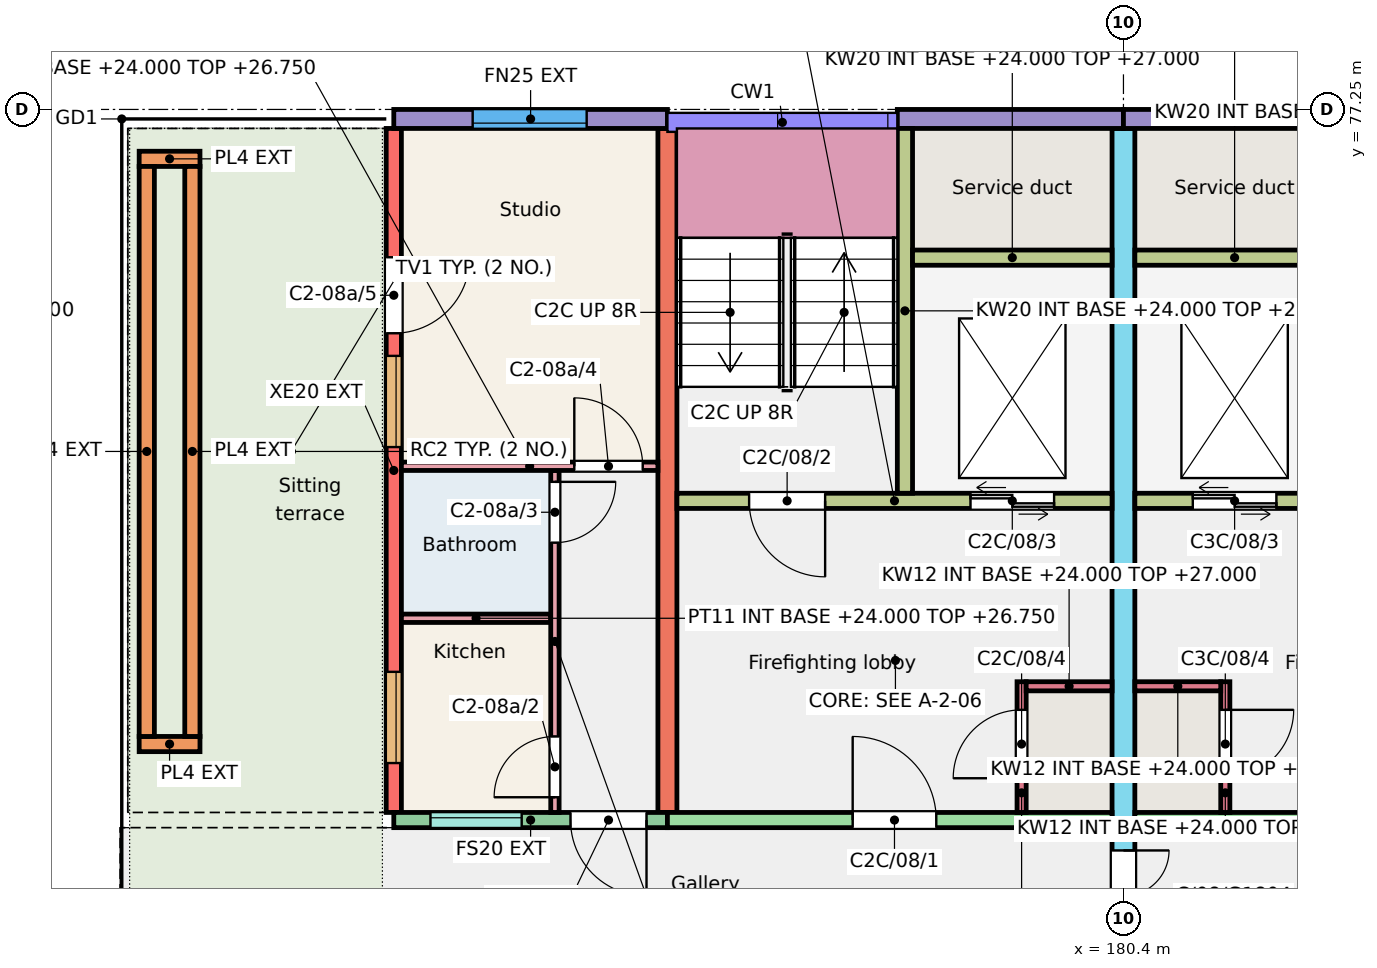
"""IFC4 building model, lengths in metres.
Left out: names, types, materials, properties, quantities, classifications, styles, units other than length and angle.
Written with IfcOpenShell. Run it as: python <this file> out.ifc"""

import sys

from ifc_helpers import new_model, si_unit, direction, frame, frame_2d, origin, place, context, subcontext, project, spatial, rectangle, extrude, element, fill, save


model = new_model("IFC4")
c1 = context("Model", 3, precision=1e-05, world=origin(), true_north=direction((0.0, 1.0)))
c2 = subcontext(c1, "Body", "Model", "MODEL_VIEW")
j1 = project(units=[si_unit("LENGTHUNIT", "METRE"), si_unit("PLANEANGLEUNIT", "RADIAN")], contexts=[c1])
p1 = place(None, origin())
s1 = spatial("IfcSite", under=j1, at=p1, CompositionType="ELEMENT")
p2 = place(p1, origin())
s2 = spatial("IfcBuilding", under=s1, at=p2, CompositionType="ELEMENT")
p3 = place(p2, frame((0.0, 0.0, 24.0)))
s3 = spatial("IfcBuildingStorey", under=s2, at=p3, CompositionType="ELEMENT", Elevation=24.0)
p4 = place(p3, frame((170.8, 68.0, 0.0), z_axis=(0.0, 0.0, 1.0), x_axis=(0.0, 1.0, 0.0)))
e1 = element("IfcWall", 1, at=p4, inside=s3, PredefinedType="SHEAR", context=c2, shape_type="SweptSolid", body=[
    extrude(rectangle(XDim=9.0, YDim=0.2, at=frame_2d((4.5, 0.0))), origin(), (0.0, 0.0, 1.0), 3.0),
])
p5 = place(p4, frame((0.65, 0.0, 0.9)))
e2 = element("IfcOpeningElement", 2, at=p5, cuts=e1, PredefinedType="OPENING", context=c2, shape_type="SweptSolid", body=[
    extrude(rectangle(XDim=1.2, YDim=1.5, at=frame_2d((0.6, 0.75))), frame((0.0, 0.11, 0.0), z_axis=(0.0, -1.0, 0.0), x_axis=(1.0, 0.0, 0.0)), (0.0, 0.0, 1.0), 0.22),
])
p6 = place(p4, frame((4.808, 0.0, 0.9)))
e3 = element("IfcOpeningElement", 3, at=p6, cuts=e1, PredefinedType="OPENING", context=c2, shape_type="SweptSolid", body=[
    extrude(rectangle(XDim=1.2, YDim=1.5, at=frame_2d((0.6, 0.75))), frame((0.0, 0.11, 0.0), z_axis=(0.0, -1.0, 0.0), x_axis=(1.0, 0.0, 0.0)), (0.0, 0.0, 1.0), 0.22),
])
p7 = place(p4, frame((6.305, 0.0, 0.0)))
e4 = element("IfcOpeningElement", 4, at=p7, cuts=e1, PredefinedType="OPENING", context=c2, shape_type="SweptSolid", body=[
    extrude(rectangle(XDim=1.0, YDim=2.1, at=frame_2d((0.5, 1.05))), frame((0.0, 0.11, 0.0), z_axis=(0.0, -1.0, 0.0), x_axis=(1.0, 0.0, 0.0)), (0.0, 0.0, 1.0), 0.22),
])
p8 = place(p3, frame((174.4, 68.0, 0.0), z_axis=(0.0, 0.0, 1.0), x_axis=(0.0, 1.0, 0.0)))
e5 = element("IfcWall", 5, at=p8, inside=s3, PredefinedType="SHEAR", context=c2, shape_type="SweptSolid", body=[
    extrude(rectangle(XDim=9.0, YDim=0.25, at=frame_2d((4.5, 0.0))), origin(), (0.0, 0.0, 1.0), 3.0),
])
p9 = place(p3, frame((180.4, 66.0, 0.0), z_axis=(0.0, 0.0, 1.0), x_axis=(0.0, 1.0, 0.0)))
e6 = element("IfcWall", 6, at=p9, inside=s3, PredefinedType="SHEAR", context=c2, shape_type="SweptSolid", body=[
    extrude(rectangle(XDim=11.0, YDim=0.3, at=frame_2d((5.5, 0.0))), origin(), (0.0, 0.0, 1.0), 3.0),
])
p10 = place(p9, frame((0.3, 0.0, 0.0)))
e7 = element("IfcOpeningElement", 7, at=p10, cuts=e6, PredefinedType="OPENING", context=c2, shape_type="SweptSolid", body=[
    extrude(rectangle(XDim=1.2, YDim=2.1, at=frame_2d((0.6, 1.05))), frame((0.0, 0.16, 0.0), z_axis=(0.0, -1.0, 0.0), x_axis=(1.0, 0.0, 0.0)), (0.0, 0.0, 1.0), 0.32),
])
p11 = place(p3, frame((170.8, 77.125, 0.0), z_axis=(0.0, 0.0, 1.0), x_axis=(1.0, 0.0, 0.0)))
e8 = element("IfcWall", 8, at=p11, inside=s3, PredefinedType="SOLIDWALL", context=c2, shape_type="SweptSolid", body=[
    extrude(rectangle(XDim=3.6, YDim=0.25, at=frame_2d((1.8, 0.0))), origin(), (0.0, 0.0, 1.0), 3.0),
])
p12 = place(p11, frame((1.038, 0.0, 0.9)))
e9 = element("IfcOpeningElement", 9, at=p12, cuts=e8, PredefinedType="OPENING", context=c2, shape_type="SweptSolid", body=[
    extrude(rectangle(XDim=1.5, YDim=1.5, at=frame_2d((0.75, 0.75))), frame((0.0, 0.135, 0.0), z_axis=(0.0, -1.0, 0.0), x_axis=(1.0, 0.0, 0.0)), (0.0, 0.0, 1.0), 0.27),
])
p13 = place(p3, frame((170.8, 67.9, 0.0), z_axis=(0.0, 0.0, 1.0), x_axis=(1.0, 0.0, 0.0)))
e10 = element("IfcWall", 10, at=p13, inside=s3, PredefinedType="SOLIDWALL", context=c2, shape_type="SweptSolid", body=[
    extrude(rectangle(XDim=3.6, YDim=0.2, at=frame_2d((1.8, 0.0))), origin(), (0.0, 0.0, 1.0), 3.0),
])
p14 = place(p13, frame((0.482, 0.0, 1.1)))
e11 = element("IfcOpeningElement", 11, at=p14, cuts=e10, PredefinedType="OPENING", context=c2, shape_type="SweptSolid", body=[
    extrude(rectangle(XDim=1.2, YDim=1.3, at=frame_2d((0.6, 0.65))), frame((0.0, 0.11, 0.0), z_axis=(0.0, -1.0, 0.0), x_axis=(1.0, 0.0, 0.0)), (0.0, 0.0, 1.0), 0.22),
])
p15 = place(p13, frame((2.325, 0.0, 0.0)))
e12 = element("IfcOpeningElement", 12, at=p15, cuts=e10, PredefinedType="OPENING", context=c2, shape_type="SweptSolid", body=[
    extrude(rectangle(XDim=1.0, YDim=2.1, at=frame_2d((0.5, 1.05))), frame((0.0, 0.11, 0.0), z_axis=(0.0, -1.0, 0.0), x_axis=(1.0, 0.0, 0.0)), (0.0, 0.0, 1.0), 0.22),
])
p16 = place(p3, frame((177.425, 77.125, 0.0), z_axis=(0.0, 0.0, 1.0), x_axis=(1.0, 0.0, 0.0)))
e13 = element("IfcWall", 13, at=p16, inside=s3, PredefinedType="SOLIDWALL", context=c2, shape_type="SweptSolid", body=[
    extrude(rectangle(XDim=2.975, YDim=0.25, at=frame_2d((1.487, 0.0))), origin(), (0.0, 0.0, 1.0), 3.0),
])
p17 = place(p3, frame((174.4, 67.9, 0.0), z_axis=(0.0, 0.0, 1.0), x_axis=(1.0, 0.0, 0.0)))
e14 = element("IfcWall", 14, at=p17, inside=s3, PredefinedType="SHEAR", context=c2, shape_type="SweptSolid", body=[
    extrude(rectangle(XDim=5.85, YDim=0.2, at=frame_2d((2.925, 0.0))), origin(), (0.0, 0.0, 1.0), 3.0),
])
p18 = place(p17, frame((2.438, 0.0, 0.0)))
e15 = element("IfcOpeningElement", 15, at=p18, cuts=e14, PredefinedType="OPENING", context=c2, shape_type="SweptSolid", body=[
    extrude(rectangle(XDim=1.1, YDim=2.1, at=frame_2d((0.55, 1.05))), frame((0.0, 0.11, 0.0), z_axis=(0.0, -1.0, 0.0), x_axis=(1.0, 0.0, 0.0)), (0.0, 0.0, 1.0), 0.22),
])
p19 = place(p3, frame((174.525, 72.1, 0.0), z_axis=(0.0, 0.0, 1.0), x_axis=(1.0, 0.0, 0.0)))
e16 = element("IfcWall", 16, at=p19, inside=s3, PredefinedType="SHEAR", context=c2, shape_type="SweptSolid", body=[
    extrude(rectangle(XDim=5.725, YDim=0.2, at=frame_2d((2.863, 0.0))), origin(), (0.0, 0.0, 1.0), 3.0),
])
p20 = place(p19, frame((0.95, 0.0, 0.0)))
e17 = element("IfcOpeningElement", 17, at=p20, cuts=e16, PredefinedType="OPENING", context=c2, shape_type="SweptSolid", body=[
    extrude(rectangle(XDim=1.0, YDim=2.1, at=frame_2d((0.5, 1.05))), frame((0.0, 0.11, 0.0), z_axis=(0.0, -1.0, 0.0), x_axis=(1.0, 0.0, 0.0)), (0.0, 0.0, 1.0), 0.22),
])
p21 = place(p19, frame((3.863, 0.0, 0.0)))
e18 = element("IfcOpeningElement", 18, at=p21, cuts=e16, PredefinedType="OPENING", context=c2, shape_type="SweptSolid", body=[
    extrude(rectangle(XDim=1.1, YDim=2.1, at=frame_2d((0.55, 1.05))), frame((0.0, 0.11, 0.0), z_axis=(0.0, -1.0, 0.0), x_axis=(1.0, 0.0, 0.0)), (0.0, 0.0, 1.0), 0.22),
])
p22 = place(p3, frame((177.525, 72.2, 0.0), z_axis=(0.0, 0.0, 1.0), x_axis=(0.0, 1.0, 0.0)))
e19 = element("IfcWall", 19, at=p22, inside=s3, PredefinedType="SHEAR", context=c2, shape_type="SweptSolid", body=[
    extrude(rectangle(XDim=4.8, YDim=0.2, at=frame_2d((2.4, 0.0))), origin(), (0.0, 0.0, 1.0), 3.0),
])
p23 = place(p3, frame((177.625, 75.3, 0.0), z_axis=(0.0, 0.0, 1.0), x_axis=(1.0, 0.0, 0.0)))
e20 = element("IfcWall", 20, at=p23, inside=s3, PredefinedType="SHEAR", context=c2, shape_type="SweptSolid", body=[
    extrude(rectangle(XDim=2.625, YDim=0.2, at=frame_2d((1.312, 0.0))), origin(), (0.0, 0.0, 1.0), 3.0),
])
p24 = place(p3, frame((179.06, 68.0, 0.0), z_axis=(0.0, 0.0, 1.0), x_axis=(0.0, 1.0, 0.0)))
e21 = element("IfcWall", 21, at=p24, inside=s3, PredefinedType="SHEAR", context=c2, shape_type="SweptSolid", body=[
    extrude(rectangle(XDim=1.72, YDim=0.12, at=frame_2d((0.86, 0.0))), origin(), (0.0, 0.0, 1.0), 3.0),
])
p25 = place(p24, frame((0.45, 0.0, 0.0)))
e22 = element("IfcOpeningElement", 22, at=p25, cuts=e21, PredefinedType="OPENING", context=c2, shape_type="SweptSolid", body=[
    extrude(rectangle(XDim=0.9, YDim=2.1, at=frame_2d((0.45, 1.05))), frame((0.0, 0.07, 0.0), z_axis=(0.0, -1.0, 0.0), x_axis=(1.0, 0.0, 0.0)), (0.0, 0.0, 1.0), 0.14),
])
p26 = place(p3, frame((179.12, 69.66, 0.0), z_axis=(0.0, 0.0, 1.0), x_axis=(1.0, 0.0, 0.0)))
e23 = element("IfcWall", 23, at=p26, inside=s3, PredefinedType="SHEAR", context=c2, shape_type="SweptSolid", body=[
    extrude(rectangle(XDim=1.13, YDim=0.12, at=frame_2d((0.565, 0.0))), origin(), (0.0, 0.0, 1.0), 3.0),
])
p27 = place(p3, frame((180.4, 77.125, 0.0), z_axis=(0.0, 0.0, 1.0), x_axis=(1.0, 0.0, 0.0)))
e24 = element("IfcWall", 24, at=p27, inside=s3, PredefinedType="SOLIDWALL", context=c2, shape_type="SweptSolid", body=[
    extrude(rectangle(XDim=2.975, YDim=0.25, at=frame_2d((1.488, 0.0))), origin(), (0.0, 0.0, 1.0), 3.0),
])
p28 = place(p3, frame((180.55, 67.9, 0.0), z_axis=(0.0, 0.0, 1.0), x_axis=(1.0, 0.0, 0.0)))
e25 = element("IfcWall", 25, at=p28, inside=s3, PredefinedType="SHEAR", context=c2, shape_type="SweptSolid", body=[
    extrude(rectangle(XDim=5.85, YDim=0.2, at=frame_2d((2.925, 0.0))), origin(), (0.0, 0.0, 1.0), 3.0),
])
p29 = place(p28, frame((2.312, 0.0, 0.0)))
e26 = element("IfcOpeningElement", 26, at=p29, cuts=e25, PredefinedType="OPENING", context=c2, shape_type="SweptSolid", body=[
    extrude(rectangle(XDim=1.1, YDim=2.1, at=frame_2d((0.55, 1.05))), frame((0.0, 0.11, 0.0), z_axis=(0.0, -1.0, 0.0), x_axis=(1.0, 0.0, 0.0)), (0.0, 0.0, 1.0), 0.22),
])
p30 = place(p3, frame((180.55, 72.1, 0.0), z_axis=(0.0, 0.0, 1.0), x_axis=(1.0, 0.0, 0.0)))
e27 = element("IfcWall", 27, at=p30, inside=s3, PredefinedType="SHEAR", context=c2, shape_type="SweptSolid", body=[
    extrude(rectangle(XDim=5.725, YDim=0.2, at=frame_2d((2.862, 0.0))), origin(), (0.0, 0.0, 1.0), 3.0),
])
p31 = place(p30, frame((3.775, 0.0, 0.0)))
e28 = element("IfcOpeningElement", 28, at=p31, cuts=e27, PredefinedType="OPENING", context=c2, shape_type="SweptSolid", body=[
    extrude(rectangle(XDim=1.0, YDim=2.1, at=frame_2d((0.5, 1.05))), frame((0.0, 0.11, 0.0), z_axis=(0.0, -1.0, 0.0), x_axis=(1.0, 0.0, 0.0)), (0.0, 0.0, 1.0), 0.22),
])
p32 = place(p30, frame((0.762, 0.0, 0.0)))
e29 = element("IfcOpeningElement", 29, at=p32, cuts=e27, PredefinedType="OPENING", context=c2, shape_type="SweptSolid", body=[
    extrude(rectangle(XDim=1.1, YDim=2.1, at=frame_2d((0.55, 1.05))), frame((0.0, 0.11, 0.0), z_axis=(0.0, -1.0, 0.0), x_axis=(1.0, 0.0, 0.0)), (0.0, 0.0, 1.0), 0.22),
])
p33 = place(p3, frame((180.55, 75.3, 0.0), z_axis=(0.0, 0.0, 1.0), x_axis=(1.0, 0.0, 0.0)))
e30 = element("IfcWall", 30, at=p33, inside=s3, PredefinedType="SHEAR", context=c2, shape_type="SweptSolid", body=[
    extrude(rectangle(XDim=2.625, YDim=0.2, at=frame_2d((1.312, 0.0))), origin(), (0.0, 0.0, 1.0), 3.0),
])
p34 = place(p3, frame((181.74, 68.0, 0.0), z_axis=(0.0, 0.0, 1.0), x_axis=(0.0, 1.0, 0.0)))
e31 = element("IfcWall", 31, at=p34, inside=s3, PredefinedType="SHEAR", context=c2, shape_type="SweptSolid", body=[
    extrude(rectangle(XDim=1.72, YDim=0.12, at=frame_2d((0.86, 0.0))), origin(), (0.0, 0.0, 1.0), 3.0),
])
p35 = place(p34, frame((0.45, 0.0, 0.0)))
e32 = element("IfcOpeningElement", 32, at=p35, cuts=e31, PredefinedType="OPENING", context=c2, shape_type="SweptSolid", body=[
    extrude(rectangle(XDim=0.9, YDim=2.1, at=frame_2d((0.45, 1.05))), frame((0.0, 0.07, 0.0), z_axis=(0.0, -1.0, 0.0), x_axis=(1.0, 0.0, 0.0)), (0.0, 0.0, 1.0), 0.14),
])
p36 = place(p3, frame((180.55, 69.66, 0.0), z_axis=(0.0, 0.0, 1.0), x_axis=(1.0, 0.0, 0.0)))
e33 = element("IfcWall", 33, at=p36, inside=s3, PredefinedType="SHEAR", context=c2, shape_type="SweptSolid", body=[
    extrude(rectangle(XDim=1.13, YDim=0.12, at=frame_2d((0.565, 0.0))), origin(), (0.0, 0.0, 1.0), 3.0),
])
for number, where, z_axis, x_axis in (
    (34, (167.45, 68.9, 0.01), (0.0, 0.0, 1.0), (1.0, 0.0, 0.0)),
    (35, (167.45, 76.6, 0.01), (0.0, 0.0, 1.0), (1.0, 0.0, 0.0)),
):
    element("IfcWall", number, at=place(p3, frame(where, z_axis=z_axis, x_axis=x_axis)), inside=s3, PredefinedType="SOLIDWALL", context=c2, shape_type="SweptSolid", body=[
        extrude(rectangle(XDim=0.8, YDim=0.2, at=frame_2d((0.4, 0.0))), origin(), (0.0, 0.0, 1.0), 0.45),
    ])
for number, where, z_axis, x_axis in (
    (36, (167.55, 69.0, 0.01), (0.0, 0.0, 1.0), (0.0, 1.0, 0.0)),
    (37, (168.15, 69.0, 0.01), (0.0, 0.0, 1.0), (0.0, 1.0, 0.0)),
):
    element("IfcWall", number, at=place(p3, frame(where, z_axis=z_axis, x_axis=x_axis)), inside=s3, PredefinedType="SOLIDWALL", context=c2, shape_type="SweptSolid", body=[
        extrude(rectangle(XDim=7.5, YDim=0.2, at=frame_2d((3.75, 0.0))), origin(), (0.0, 0.0, 1.0), 0.45),
    ])
p37 = place(p3, frame((170.9, 70.555, 0.0), z_axis=(0.0, 0.0, 1.0), x_axis=(1.0, 0.0, 0.0)))
e38 = element("IfcWall", 38, at=p37, inside=s3, PredefinedType="PARTITIONING", context=c2, shape_type="SweptSolid", body=[
    extrude(rectangle(XDim=1.965, YDim=0.11, at=frame_2d((0.982, 0.0))), origin(), (0.0, 0.0, 1.0), 2.75),
])
p38 = place(p3, frame((172.92, 68.0, 0.0), z_axis=(0.0, 0.0, 1.0), x_axis=(0.0, 1.0, 0.0)))
e39 = element("IfcWall", 39, at=p38, inside=s3, PredefinedType="PARTITIONING", context=c2, shape_type="SweptSolid", body=[
    extrude(rectangle(XDim=4.5, YDim=0.11, at=frame_2d((2.25, 0.0))), origin(), (0.0, 0.0, 1.0), 2.75),
])
p39 = place(p38, frame((0.2, 0.0, 0.0)))
e40 = element("IfcOpeningElement", 40, at=p39, cuts=e39, PredefinedType="OPENING", context=c2, shape_type="SweptSolid", body=[
    extrude(rectangle(XDim=0.8, YDim=2.1, at=frame_2d((0.4, 1.05))), frame((0.0, 0.065, 0.0), z_axis=(0.0, -1.0, 0.0), x_axis=(1.0, 0.0, 0.0)), (0.0, 0.0, 1.0), 0.13),
])
p40 = place(p38, frame((3.55, 0.0, 0.0)))
e41 = element("IfcOpeningElement", 41, at=p40, cuts=e39, PredefinedType="OPENING", context=c2, shape_type="SweptSolid", body=[
    extrude(rectangle(XDim=0.8, YDim=2.1, at=frame_2d((0.4, 1.05))), frame((0.0, 0.065, 0.0), z_axis=(0.0, -1.0, 0.0), x_axis=(1.0, 0.0, 0.0)), (0.0, 0.0, 1.0), 0.13),
])
p41 = place(p3, frame((170.9, 72.555, 0.0), z_axis=(0.0, 0.0, 1.0), x_axis=(1.0, 0.0, 0.0)))
e42 = element("IfcWall", 42, at=p41, inside=s3, PredefinedType="PARTITIONING", context=c2, shape_type="SweptSolid", body=[
    extrude(rectangle(XDim=3.375, YDim=0.11, at=frame_2d((1.688, 0.0))), origin(), (0.0, 0.0, 1.0), 2.75),
])
p42 = place(p41, frame((2.275, 0.0, 0.0)))
e43 = element("IfcOpeningElement", 43, at=p42, cuts=e42, PredefinedType="OPENING", context=c2, shape_type="SweptSolid", body=[
    extrude(rectangle(XDim=0.9, YDim=2.1, at=frame_2d((0.45, 1.05))), frame((0.0, 0.065, 0.0), z_axis=(0.0, -1.0, 0.0), x_axis=(1.0, 0.0, 0.0)), (0.0, 0.0, 1.0), 0.13),
])
p43 = place(p14, origin())
e44 = element("IfcWindow", 44, at=p43, inside=s3, PartitioningType="SINGLE_PANEL", PredefinedType="WINDOW", context=c2, shape_type="SweptSolid", body=[
    extrude(rectangle(XDim=1.2, YDim=1.3, at=frame_2d((0.6, 0.65))), frame((0.0, 0.06, 0.0), z_axis=(0.0, -1.0, 0.0), x_axis=(1.0, 0.0, 0.0)), (0.0, 0.0, 1.0), 0.06),
])
fill(e11, e44)
p44 = place(p12, origin())
e45 = element("IfcWindow", 45, at=p44, inside=s3, PartitioningType="SINGLE_PANEL", PredefinedType="WINDOW", context=c2, shape_type="SweptSolid", body=[
    extrude(rectangle(XDim=1.5, YDim=1.5, at=frame_2d((0.75, 0.75))), frame((0.0, -0.025, 0.0), z_axis=(0.0, -1.0, 0.0), x_axis=(1.0, 0.0, 0.0)), (0.0, 0.0, 1.0), 0.06),
])
fill(e9, e45)
p45 = place(p5, origin())
e46 = element("IfcWindow", 46, at=p45, inside=s3, PartitioningType="SINGLE_PANEL", PredefinedType="WINDOW", context=c2, shape_type="SweptSolid", body=[
    extrude(rectangle(XDim=1.2, YDim=1.5, at=frame_2d((0.6, 0.75))), frame((0.0, 0.0, 0.0), z_axis=(0.0, -1.0, 0.0), x_axis=(1.0, 0.0, 0.0)), (0.0, 0.0, 1.0), 0.06),
])
fill(e2, e46)
p46 = place(p6, origin())
e47 = element("IfcWindow", 47, at=p46, inside=s3, PartitioningType="SINGLE_PANEL", PredefinedType="WINDOW", context=c2, shape_type="SweptSolid", body=[
    extrude(rectangle(XDim=1.2, YDim=1.5, at=frame_2d((0.6, 0.75))), frame((0.0, 0.0, 0.0), z_axis=(0.0, -1.0, 0.0), x_axis=(1.0, 0.0, 0.0)), (0.0, 0.0, 1.0), 0.06),
])
fill(e3, e47)
p47 = place(p15, origin())
e48 = element("IfcDoor", 48, at=p47, inside=s3, OperationType="SINGLE_SWING_RIGHT", PredefinedType="DOOR", context=c2, shape_type="SweptSolid", body=[
    extrude(rectangle(XDim=1.0, YDim=2.1, at=frame_2d((0.5, 1.05))), frame((0.0, 0.025, 0.0), z_axis=(0.0, -1.0, 0.0), x_axis=(1.0, 0.0, 0.0)), (0.0, 0.0, 1.0), 0.05),
])
fill(e12, e48)
p48 = place(p39, origin())
e49 = element("IfcDoor", 49, at=p48, inside=s3, OperationType="SINGLE_SWING_LEFT", PredefinedType="DOOR", context=c2, shape_type="SweptSolid", body=[
    extrude(rectangle(XDim=0.8, YDim=2.1, at=frame_2d((0.4, 1.05))), frame((0.0, 0.025, 0.0), z_axis=(0.0, -1.0, 0.0), x_axis=(1.0, 0.0, 0.0)), (0.0, 0.0, 1.0), 0.05),
])
fill(e40, e49)
p49 = place(p40, origin())
e50 = element("IfcDoor", 50, at=p49, inside=s3, OperationType="SINGLE_SWING_RIGHT", PredefinedType="DOOR", context=c2, shape_type="SweptSolid", body=[
    extrude(rectangle(XDim=0.8, YDim=2.1, at=frame_2d((0.4, 1.05))), frame((0.0, 0.025, 0.0), z_axis=(0.0, -1.0, 0.0), x_axis=(1.0, 0.0, 0.0)), (0.0, 0.0, 1.0), 0.05),
])
fill(e41, e50)
p50 = place(p42, origin())
e51 = element("IfcDoor", 51, at=p50, inside=s3, OperationType="SINGLE_SWING_LEFT", PredefinedType="DOOR", context=c2, shape_type="SweptSolid", body=[
    extrude(rectangle(XDim=0.9, YDim=2.1, at=frame_2d((0.45, 1.05))), frame((0.0, 0.025, 0.0), z_axis=(0.0, -1.0, 0.0), x_axis=(1.0, 0.0, 0.0)), (0.0, 0.0, 1.0), 0.05),
])
fill(e43, e51)
p51 = place(p7, origin())
e52 = element("IfcDoor", 52, at=p51, inside=s3, OperationType="SINGLE_SWING_RIGHT", PredefinedType="DOOR", context=c2, shape_type="SweptSolid", body=[
    extrude(rectangle(XDim=1.0, YDim=2.1, at=frame_2d((0.5, 1.05))), frame((0.0, 0.025, 0.0), z_axis=(0.0, -1.0, 0.0), x_axis=(1.0, 0.0, 0.0)), (0.0, 0.0, 1.0), 0.05),
])
fill(e4, e52)
p52 = place(p18, origin())
e53 = element("IfcDoor", 53, at=p52, inside=s3, OperationType="SINGLE_SWING_LEFT", PredefinedType="DOOR", context=c2, shape_type="SweptSolid", body=[
    extrude(rectangle(XDim=1.1, YDim=2.1, at=frame_2d((0.55, 1.05))), frame((0.0, 0.025, 0.0), z_axis=(0.0, -1.0, 0.0), x_axis=(1.0, 0.0, 0.0)), (0.0, 0.0, 1.0), 0.05),
])
fill(e15, e53)
p53 = place(p20, origin())
e54 = element("IfcDoor", 54, at=p53, inside=s3, OperationType="SINGLE_SWING_RIGHT", PredefinedType="DOOR", context=c2, shape_type="SweptSolid", body=[
    extrude(rectangle(XDim=1.0, YDim=2.1, at=frame_2d((0.5, 1.05))), frame((0.0, 0.025, 0.0), z_axis=(0.0, -1.0, 0.0), x_axis=(1.0, 0.0, 0.0)), (0.0, 0.0, 1.0), 0.05),
])
fill(e17, e54)
p54 = place(p21, origin())
e55 = element("IfcDoor", 55, at=p54, inside=s3, OperationType="DOUBLE_DOOR_SLIDING", PredefinedType="DOOR", context=c2, shape_type="SweptSolid", body=[
    extrude(rectangle(XDim=1.1, YDim=2.1, at=frame_2d((0.55, 1.05))), frame((0.0, 0.025, 0.0), z_axis=(0.0, -1.0, 0.0), x_axis=(1.0, 0.0, 0.0)), (0.0, 0.0, 1.0), 0.05),
])
fill(e18, e55)
p55 = place(p25, origin())
e56 = element("IfcDoor", 56, at=p55, inside=s3, OperationType="SINGLE_SWING_LEFT", PredefinedType="DOOR", context=c2, shape_type="SweptSolid", body=[
    extrude(rectangle(XDim=0.9, YDim=2.1, at=frame_2d((0.45, 1.05))), frame((0.0, 0.025, 0.0), z_axis=(0.0, -1.0, 0.0), x_axis=(1.0, 0.0, 0.0)), (0.0, 0.0, 1.0), 0.05),
])
fill(e22, e56)
p56 = place(p32, origin())
e57 = element("IfcDoor", 57, at=p56, inside=s3, OperationType="DOUBLE_DOOR_SLIDING", PredefinedType="DOOR", context=c2, shape_type="SweptSolid", body=[
    extrude(rectangle(XDim=1.1, YDim=2.1, at=frame_2d((0.55, 1.05))), frame((0.0, 0.025, 0.0), z_axis=(0.0, -1.0, 0.0), x_axis=(1.0, 0.0, 0.0)), (0.0, 0.0, 1.0), 0.05),
])
fill(e29, e57)
p57 = place(p35, origin())
e58 = element("IfcDoor", 58, at=p57, inside=s3, OperationType="SINGLE_SWING_RIGHT", PredefinedType="DOOR", context=c2, shape_type="SweptSolid", body=[
    extrude(rectangle(XDim=0.9, YDim=2.1, at=frame_2d((0.45, 1.05))), frame((0.0, 0.025, 0.0), z_axis=(0.0, -1.0, 0.0), x_axis=(1.0, 0.0, 0.0)), (0.0, 0.0, 1.0), 0.05),
])
fill(e32, e58)
p58 = place(p10, origin())
e59 = element("IfcDoor", 59, at=p58, inside=s3, OperationType="DOUBLE_DOOR_SINGLE_SWING", PredefinedType="DOOR", context=c2, shape_type="SweptSolid", body=[
    extrude(rectangle(XDim=1.2, YDim=2.1, at=frame_2d((0.6, 1.05))), frame((0.0, 0.025, 0.0), z_axis=(0.0, -1.0, 0.0), x_axis=(1.0, 0.0, 0.0)), (0.0, 0.0, 1.0), 0.05),
])
fill(e7, e59)
save(model, sys.argv[1])
